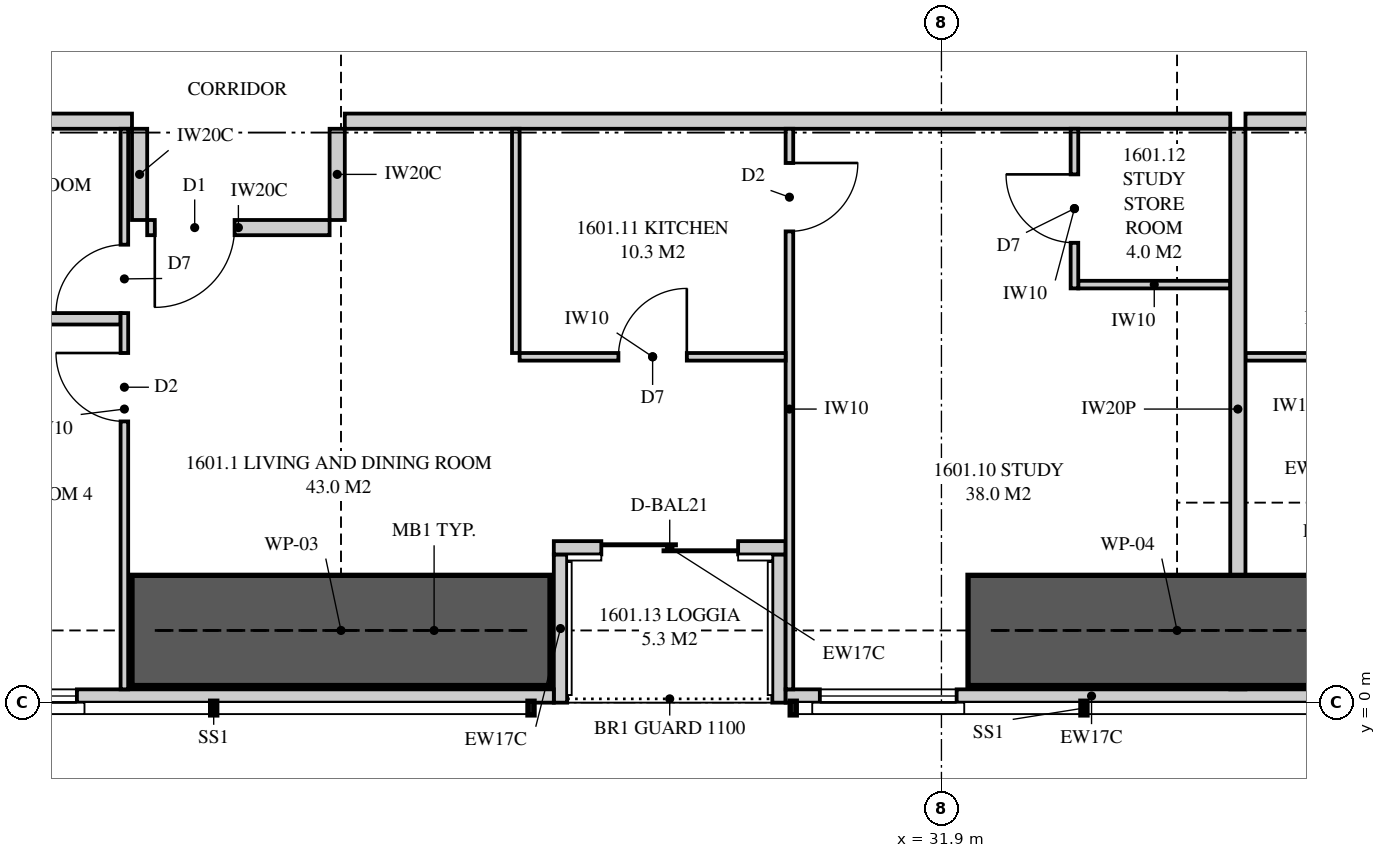
"""IFC4 building model, lengths in metres.
Left out: names, types, materials, properties, quantities, classifications, styles, units other than length and angle.
Written with IfcOpenShell. Run it as: python <this file> out.ifc"""

import sys

from ifc_helpers import new_model, si_unit, direction, frame, frame_2d, origin, place, context, subcontext, project, spatial, polyline, rectangle, outline, extrude, element, fill, save


model = new_model("IFC4")
c1 = context("Model", 3, precision=1e-05, world=origin(), true_north=direction((0.0, 1.0)))
c2 = subcontext(c1, "Body", "Model", "MODEL_VIEW")
j1 = project(units=[si_unit("LENGTHUNIT", "METRE"), si_unit("PLANEANGLEUNIT", "RADIAN")], contexts=[c1])
p1 = place(None, origin())
s1 = spatial("IfcSite", under=j1, at=p1, CompositionType="ELEMENT")
p2 = place(p1, origin())
s2 = spatial("IfcBuilding", under=s1, at=p2, CompositionType="ELEMENT")
p3 = place(p2, frame((0.0, 0.0, 61.2)))
s3 = spatial("IfcBuildingStorey", under=s2, at=p3, CompositionType="ELEMENT", Elevation=61.2)
p4 = place(p3, frame((5.051, 0.087, 0.0), z_axis=(0.0, 0.0, 1.0), x_axis=(1.0, 0.0, 0.0)))
e1 = element("IfcWall", 1, at=p4, inside=s3, PredefinedType="SOLIDWALL", context=c2, shape_type="SweptSolid", body=[
    extrude(outline(polyline([(0.0, 0.0), (21.749, 0.0), (21.749, 2.15), (7.949, 2.15), (7.949, 3.11), (7.793, 3.11), (7.793, 2.15), (7.745, 2.15), (7.745, 3.11), (0.0, 3.11), (0.0, 0.0)])), frame((0.0, 0.087, 0.0), z_axis=(0.0, -1.0, 0.0), x_axis=(1.0, 0.0, 0.0)), (0.0, 0.0, 1.0), 0.175),
])
p5 = place(p4, frame((3.234, 0.0, 0.4)))
e2 = element("IfcOpeningElement", 2, at=p5, cuts=e1, PredefinedType="OPENING", context=c2, shape_type="SweptSolid", body=[
    extrude(rectangle(XDim=1.8, YDim=1.7, at=frame_2d((0.9, 0.85))), frame((0.0, 0.097, 0.0), z_axis=(0.0, -1.0, 0.0), x_axis=(1.0, 0.0, 0.0)), (0.0, 0.0, 1.0), 0.195),
])
p6 = place(p4, frame((10.806, 0.0, 0.4)))
e3 = element("IfcOpeningElement", 3, at=p6, cuts=e1, PredefinedType="OPENING", context=c2, shape_type="SweptSolid", body=[
    extrude(rectangle(XDim=1.8, YDim=1.7, at=frame_2d((0.9, 0.85))), frame((0.0, 0.097, 0.0), z_axis=(0.0, -1.0, 0.0), x_axis=(1.0, 0.0, 0.0)), (0.0, 0.0, 1.0), 0.195),
])
p7 = place(p4, frame((13.674, 0.0, 0.4)))
e4 = element("IfcOpeningElement", 4, at=p7, cuts=e1, PredefinedType="OPENING", context=c2, shape_type="SweptSolid", body=[
    extrude(rectangle(XDim=1.8, YDim=1.7, at=frame_2d((0.9, 0.85))), frame((0.0, 0.097, 0.0), z_axis=(0.0, -1.0, 0.0), x_axis=(1.0, 0.0, 0.0)), (0.0, 0.0, 1.0), 0.195),
])
p8 = place(p3, frame((29.85, 0.087, 0.0), z_axis=(0.0, 0.0, 1.0), x_axis=(1.0, 0.0, 0.0)))
e5 = element("IfcWall", 5, at=p8, inside=s3, PredefinedType="SOLIDWALL", context=c2, shape_type="SweptSolid", body=[
    extrude(outline(polyline([(0.0, 0.0), (8.05, 0.0), (8.05, 3.11), (5.354, 3.11), (5.354, 2.15), (5.306, 2.15), (5.306, 3.11), (5.15, 3.11), (5.15, 2.15), (0.0, 2.15), (0.0, 0.0)])), frame((0.0, 0.087, 0.0), z_axis=(0.0, -1.0, 0.0), x_axis=(1.0, 0.0, 0.0)), (0.0, 0.0, 1.0), 0.175),
])
p9 = place(p8, frame((0.45, 0.0, 0.4)))
e6 = element("IfcOpeningElement", 6, at=p9, cuts=e5, PredefinedType="OPENING", context=c2, shape_type="SweptSolid", body=[
    extrude(rectangle(XDim=1.8, YDim=1.7, at=frame_2d((0.9, 0.85))), frame((0.0, 0.097, 0.0), z_axis=(0.0, -1.0, 0.0), x_axis=(1.0, 0.0, 0.0)), (0.0, 0.0, 1.0), 0.195),
])
p10 = place(p3, frame((26.8, 2.038, 0.0), z_axis=(0.0, 0.0, 1.0), x_axis=(1.0, 0.0, 0.0)))
e7 = element("IfcWall", 7, at=p10, inside=s3, PredefinedType="SOLIDWALL", context=c2, shape_type="SweptSolid", body=[
    extrude(rectangle(XDim=3.05, YDim=0.175, at=frame_2d((1.525, 0.0))), origin(), (0.0, 0.0, 1.0), 3.11),
])
p11 = place(p10, frame((0.625, 0.0, 0.0)))
e8 = element("IfcOpeningElement", 8, at=p11, cuts=e7, PredefinedType="OPENING", context=c2, shape_type="SweptSolid", body=[
    extrude(rectangle(XDim=1.8, YDim=2.1, at=frame_2d((0.9, 1.05))), frame((0.0, 0.097, 0.0), z_axis=(0.0, -1.0, 0.0), x_axis=(1.0, 0.0, 0.0)), (0.0, 0.0, 1.0), 0.195),
])
for number, where, z_axis, x_axis in (
    (9, (26.887, 0.0, 0.0), (0.0, 0.0, 1.0), (0.0, 1.0, 0.0)),
    (10, (29.762, 0.0, 0.0), (0.0, 0.0, 1.0), (0.0, 1.0, 0.0)),
):
    element("IfcWall", number, at=place(p3, frame(where, z_axis=z_axis, x_axis=x_axis)), inside=s3, PredefinedType="SOLIDWALL", context=c2, shape_type="SweptSolid", body=[
        extrude(outline(polyline([(0.0, 0.0), (1.95, 0.0), (1.95, 3.11), (1.75, 3.11), (1.75, 2.15), (0.15, 2.15), (0.15, 3.11), (0.0, 3.11), (0.0, 0.0)])), frame((0.0, 0.087, 0.0), z_axis=(0.0, -1.0, 0.0), x_axis=(1.0, 0.0, 0.0)), (0.0, 0.0, 1.0), 0.175),
    ])
p12 = place(p3, frame((35.8, 0.175, 0.0), z_axis=(0.0, 0.0, 1.0), x_axis=(0.0, 1.0, 0.0)))
e11 = element("IfcWall", 11, at=p12, inside=s3, PredefinedType="PARTITIONING", context=c2, shape_type="SweptSolid", body=[
    extrude(outline(polyline([(0.008, 3.11), (0.0, 3.11), (0.0, 0.0), (0.529, 0.0), (0.529, 0.957), (1.021, 0.957), (1.021, 0.0), (7.375, 0.0), (7.375, 3.11), (3.766, 3.11), (3.766, 2.51), (1.864, 2.51), (1.864, 2.15), (1.021, 2.15), (1.021, 1.193), (0.529, 1.193), (0.529, 2.15), (0.008, 2.15), (0.008, 3.11)])), frame((0.0, 0.1, 0.0), z_axis=(0.0, -1.0, 0.0), x_axis=(1.0, 0.0, 0.0)), (0.0, 0.0, 1.0), 0.2),
])
p13 = place(p3, frame((17.725, 7.65, 0.0), z_axis=(0.0, 0.0, 1.0), x_axis=(1.0, 0.0, 0.0)))
e12 = element("IfcWall", 12, at=p13, inside=s3, PredefinedType="PARTITIONING", context=c2, shape_type="SweptSolid", body=[
    extrude(rectangle(XDim=3.525, YDim=0.2, at=frame_2d((1.762, 0.0))), origin(), (0.0, 0.0, 1.0), 3.11),
])
p14 = place(p3, frame((21.15, 0.175, 0.0), z_axis=(0.0, 0.0, 1.0), x_axis=(0.0, 1.0, 0.0)))
e13 = element("IfcWall", 13, at=p14, inside=s3, PredefinedType="PARTITIONING", context=c2, shape_type="SweptSolid", body=[
    extrude(outline(polyline([(0.0, 0.0), (7.375, 0.0), (7.375, 3.11), (1.635, 3.11), (1.635, 2.15), (0.0, 2.15), (0.0, 3.11), (0.0, 0.0)])), frame((0.0, 0.05, 0.0), z_axis=(0.0, -1.0, 0.0), x_axis=(1.0, 0.0, 0.0)), (0.0, 0.0, 1.0), 0.1),
])
p15 = place(p14, frame((3.525, 0.0, 0.0)))
e14 = element("IfcOpeningElement", 14, at=p15, cuts=e13, PredefinedType="OPENING", context=c2, shape_type="SweptSolid", body=[
    extrude(rectangle(XDim=0.9, YDim=2.1, at=frame_2d((0.45, 1.05))), frame((0.0, 0.06, 0.0), z_axis=(0.0, -1.0, 0.0), x_axis=(1.0, 0.0, 0.0)), (0.0, 0.0, 1.0), 0.12),
])
p16 = place(p14, frame((4.95, 0.0, 0.0)))
e15 = element("IfcOpeningElement", 15, at=p16, cuts=e13, PredefinedType="OPENING", context=c2, shape_type="SweptSolid", body=[
    extrude(rectangle(XDim=0.9, YDim=2.1, at=frame_2d((0.45, 1.05))), frame((0.0, 0.06, 0.0), z_axis=(0.0, -1.0, 0.0), x_axis=(1.0, 0.0, 0.0)), (0.0, 0.0, 1.0), 0.12),
])
p17 = place(p3, frame((18.15, 5.05, 0.0), z_axis=(0.0, 0.0, 1.0), x_axis=(1.0, 0.0, 0.0)))
e16 = element("IfcWall", 16, at=p17, inside=s3, PredefinedType="PLUMBINGWALL", context=c2, shape_type="SweptSolid", body=[
    extrude(rectangle(XDim=2.95, YDim=0.15, at=frame_2d((1.475, 0.0))), origin(), (0.0, 0.0, 1.0), 3.11),
])
p18 = place(p3, frame((29.9, 0.175, 0.0), z_axis=(0.0, 0.0, 1.0), x_axis=(0.0, 1.0, 0.0)))
e17 = element("IfcWall", 17, at=p18, inside=s3, PredefinedType="PARTITIONING", context=c2, shape_type="SweptSolid", body=[
    extrude(outline(polyline([(0.0, 0.0), (7.375, 0.0), (7.375, 3.11), (1.635, 3.11), (1.635, 2.15), (0.0, 2.15), (0.0, 3.11), (0.0, 0.0)])), frame((0.0, 0.05, 0.0), z_axis=(0.0, -1.0, 0.0), x_axis=(1.0, 0.0, 0.0)), (0.0, 0.0, 1.0), 0.1),
])
p19 = place(p18, frame((6.025, 0.0, 0.0)))
e18 = element("IfcOpeningElement", 18, at=p19, cuts=e17, PredefinedType="OPENING", context=c2, shape_type="SweptSolid", body=[
    extrude(rectangle(XDim=0.9, YDim=2.1, at=frame_2d((0.45, 1.05))), frame((0.0, 0.06, 0.0), z_axis=(0.0, -1.0, 0.0), x_axis=(1.0, 0.0, 0.0)), (0.0, 0.0, 1.0), 0.12),
])
p20 = place(p3, frame((26.35, 4.55, 0.0), z_axis=(0.0, 0.0, 1.0), x_axis=(1.0, 0.0, 0.0)))
e19 = element("IfcWall", 19, at=p20, inside=s3, PredefinedType="PARTITIONING", context=c2, shape_type="SweptSolid", body=[
    extrude(rectangle(XDim=3.5, YDim=0.1, at=frame_2d((1.75, 0.0))), origin(), (0.0, 0.0, 1.0), 3.11),
])
p21 = place(p20, frame((1.3, 0.0, 0.0)))
e20 = element("IfcOpeningElement", 20, at=p21, cuts=e19, PredefinedType="OPENING", context=c2, shape_type="SweptSolid", body=[
    extrude(rectangle(XDim=0.9, YDim=2.1, at=frame_2d((0.45, 1.05))), frame((0.0, 0.06, 0.0), z_axis=(0.0, -1.0, 0.0), x_axis=(1.0, 0.0, 0.0)), (0.0, 0.0, 1.0), 0.12),
])
p22 = place(p3, frame((26.3, 4.6, 0.0), z_axis=(0.0, 0.0, 1.0), x_axis=(0.0, 1.0, 0.0)))
e21 = element("IfcWall", 21, at=p22, inside=s3, PredefinedType="PARTITIONING", context=c2, shape_type="SweptSolid", body=[
    extrude(rectangle(XDim=2.95, YDim=0.1, at=frame_2d((1.475, 0.0))), origin(), (0.0, 0.0, 1.0), 3.11),
])
p23 = place(p3, frame((35.9, 7.65, 0.0), z_axis=(0.0, 0.0, 1.0), x_axis=(1.0, 0.0, 0.0)))
e22 = element("IfcWall", 22, at=p23, inside=s3, PredefinedType="PARTITIONING", context=c2, shape_type="SweptSolid", body=[
    extrude(outline(polyline([(0.0, 0.0), (10.1, 0.0), (10.1, 3.11), (9.204, 3.11), (9.204, 2.15), (7.361, 2.15), (7.361, 3.11), (0.0, 3.11), (0.0, 0.0)])), frame((0.0, 0.1, 0.0), z_axis=(0.0, -1.0, 0.0), x_axis=(1.0, 0.0, 0.0)), (0.0, 0.0, 1.0), 0.2),
])
p24 = place(p23, frame((2.1, 0.0, 0.0)))
e23 = element("IfcOpeningElement", 23, at=p24, cuts=e22, PredefinedType="OPENING", context=c2, shape_type="SweptSolid", body=[
    extrude(rectangle(XDim=1.05, YDim=2.2, at=frame_2d((0.525, 1.1))), frame((0.0, 0.11, 0.0), z_axis=(0.0, -1.0, 0.0), x_axis=(1.0, 0.0, 0.0)), (0.0, 0.0, 1.0), 0.22),
])
p25 = place(p3, frame((35.9, 4.55, 0.0), z_axis=(0.0, 0.0, 1.0), x_axis=(1.0, 0.0, 0.0)))
e24 = element("IfcWall", 24, at=p25, inside=s3, PredefinedType="PARTITIONING", context=c2, shape_type="SweptSolid", body=[
    extrude(rectangle(XDim=3.55, YDim=0.1, at=frame_2d((1.775, 0.0))), origin(), (0.0, 0.0, 1.0), 3.11),
])
p26 = place(p25, frame((1.35, 0.0, 0.0)))
e25 = element("IfcOpeningElement", 25, at=p26, cuts=e24, PredefinedType="OPENING", context=c2, shape_type="SweptSolid", body=[
    extrude(rectangle(XDim=0.9, YDim=2.1, at=frame_2d((0.45, 1.05))), frame((0.0, 0.06, 0.0), z_axis=(0.0, -1.0, 0.0), x_axis=(1.0, 0.0, 0.0)), (0.0, 0.0, 1.0), 0.12),
])
p27 = place(p3, frame((24.05, 7.65, 0.0), z_axis=(0.0, 0.0, 1.0), x_axis=(1.0, 0.0, 0.0)))
e26 = element("IfcWall", 26, at=p27, inside=s3, PredefinedType="PARTITIONING", context=c2, shape_type="SweptSolid", body=[
    extrude(outline(polyline([(0.0, 0.0), (11.65, 0.0), (11.65, 3.11), (11.287, 3.11), (11.287, 2.541), (10.613, 2.541), (10.613, 3.11), (0.287, 3.11), (0.287, 2.541), (0.0, 2.541), (0.0, 3.11), (0.0, 0.0)])), frame((0.0, 0.1, 0.0), z_axis=(0.0, -1.0, 0.0), x_axis=(1.0, 0.0, 0.0)), (0.0, 0.0, 1.0), 0.2),
])
p28 = place(p3, frame((21.45, 6.25, 0.0), z_axis=(0.0, 0.0, 1.0), x_axis=(1.0, 0.0, 0.0)))
e27 = element("IfcWall", 27, at=p28, inside=s3, PredefinedType="PARTITIONING", context=c2, shape_type="SweptSolid", body=[
    extrude(outline(polyline([(0.0, 0.0), (2.4, 0.0), (2.4, 3.11), (2.4, 2.541), (2.213, 2.541), (2.213, 3.11), (0.0, 3.11), (0.0, 0.0)])), frame((0.0, 0.1, 0.0), z_axis=(0.0, -1.0, 0.0), x_axis=(1.0, 0.0, 0.0)), (0.0, 0.0, 1.0), 0.2),
])
p29 = place(p28, frame((0.1, 0.0, 0.0)))
e28 = element("IfcOpeningElement", 28, at=p29, cuts=e27, PredefinedType="OPENING", context=c2, shape_type="SweptSolid", body=[
    extrude(rectangle(XDim=1.05, YDim=2.2, at=frame_2d((0.525, 1.1))), frame((0.0, 0.11, 0.0), z_axis=(0.0, -1.0, 0.0), x_axis=(1.0, 0.0, 0.0)), (0.0, 0.0, 1.0), 0.22),
])
p30 = place(p3, frame((21.35, 7.55, 0.0), z_axis=(0.0, 0.0, 1.0), x_axis=(0.0, -1.0, 0.0)))
e29 = element("IfcWall", 29, at=p30, inside=s3, PredefinedType="PARTITIONING", context=c2, shape_type="SweptSolid", body=[
    extrude(rectangle(XDim=1.2, YDim=0.2, at=frame_2d((0.6, 0.0))), origin(), (0.0, 0.0, 1.0), 3.11),
])
p31 = place(p3, frame((23.95, 7.55, 0.0), z_axis=(0.0, 0.0, 1.0), x_axis=(0.0, -1.0, 0.0)))
e30 = element("IfcWall", 30, at=p31, inside=s3, PredefinedType="PARTITIONING", context=c2, shape_type="SweptSolid", body=[
    extrude(outline(polyline([(0.0, 0.0), (1.2, 0.0), (1.2, 3.11), (1.2, 2.541), (0.0, 2.541), (0.0, 3.11), (0.0, 0.0)])), frame((0.0, 0.1, 0.0), z_axis=(0.0, -1.0, 0.0), x_axis=(1.0, 0.0, 0.0)), (0.0, 0.0, 1.0), 0.2),
])
p32 = place(p3, frame((33.65, 7.55, 0.0), z_axis=(0.0, 0.0, 1.0), x_axis=(0.0, -1.0, 0.0)))
e31 = element("IfcWall", 31, at=p32, inside=s3, PredefinedType="PARTITIONING", context=c2, shape_type="SweptSolid", body=[
    extrude(rectangle(XDim=2.1, YDim=0.1, at=frame_2d((1.05, 0.0))), origin(), (0.0, 0.0, 1.0), 3.11),
])
p33 = place(p32, frame((0.6, 0.0, 0.0)))
e32 = element("IfcOpeningElement", 32, at=p33, cuts=e31, PredefinedType="OPENING", context=c2, shape_type="SweptSolid", body=[
    extrude(rectangle(XDim=0.9, YDim=2.1, at=frame_2d((0.45, 1.05))), frame((0.0, 0.06, 0.0), z_axis=(0.0, -1.0, 0.0), x_axis=(1.0, 0.0, 0.0)), (0.0, 0.0, 1.0), 0.12),
])
p34 = place(p3, frame((35.7, 5.5, 0.0), z_axis=(0.0, 0.0, 1.0), x_axis=(-1.0, 0.0, 0.0)))
e33 = element("IfcWall", 33, at=p34, inside=s3, PredefinedType="PARTITIONING", context=c2, shape_type="SweptSolid", body=[
    extrude(outline(polyline([(0.0, 0.0), (2.0, 0.0), (2.0, 3.11), (0.987, 3.11), (0.987, 2.541), (0.413, 2.541), (0.413, 3.11), (0.0, 3.11), (0.0, 0.0)])), frame((0.0, 0.05, 0.0), z_axis=(0.0, -1.0, 0.0), x_axis=(1.0, 0.0, 0.0)), (0.0, 0.0, 1.0), 0.1),
])
for number, where, z_axis, x_axis in (
    (34, (21.25, 0.95, 0.0), (0.0, 0.0, 1.0), (1.0, 0.0, 0.0)),
    (35, (32.25, 0.95, 0.0), (0.0, 0.0, 1.0), (1.0, 0.0, 0.0)),
):
    element("IfcWall", number, at=place(p3, frame(where, z_axis=z_axis, x_axis=x_axis)), inside=s3, PredefinedType="SHEAR", context=c2, shape_type="SweptSolid", body=[
        extrude(rectangle(XDim=5.5, YDim=1.45, at=frame_2d((2.75, 0.0))), origin(), (0.0, 0.0, 1.0), 3.35),
    ])
p35 = place(p7, origin())
e36 = element("IfcWindow", 36, at=p35, inside=s3, PartitioningType="SINGLE_PANEL", PredefinedType="WINDOW", context=c2, shape_type="SweptSolid", body=[
    extrude(rectangle(XDim=1.8, YDim=1.7, at=frame_2d((0.9, 0.85))), frame((0.0, 0.03, 0.0), z_axis=(0.0, -1.0, 0.0), x_axis=(1.0, 0.0, 0.0)), (0.0, 0.0, 1.0), 0.06),
])
fill(e4, e36)
p36 = place(p11, origin())
e37 = element("IfcDoor", 37, at=p36, inside=s3, OperationType="SLIDING_TO_LEFT", PredefinedType="DOOR", context=c2, shape_type="SweptSolid", body=[
    extrude(rectangle(XDim=1.8, YDim=2.1, at=frame_2d((0.9, 1.05))), frame((0.0, 0.025, 0.0), z_axis=(0.0, -1.0, 0.0), x_axis=(1.0, 0.0, 0.0)), (0.0, 0.0, 1.0), 0.05),
])
fill(e8, e37)
p37 = place(p9, origin())
e38 = element("IfcWindow", 38, at=p37, inside=s3, PartitioningType="SINGLE_PANEL", PredefinedType="WINDOW", context=c2, shape_type="SweptSolid", body=[
    extrude(rectangle(XDim=1.8, YDim=1.7, at=frame_2d((0.9, 0.85))), frame((0.0, 0.03, 0.0), z_axis=(0.0, -1.0, 0.0), x_axis=(1.0, 0.0, 0.0)), (0.0, 0.0, 1.0), 0.06),
])
fill(e6, e38)
p38 = place(p29, frame((1.05, 0.0, 0.0), z_axis=(0.0, 0.0, 1.0), x_axis=(-1.0, 0.0, 0.0)))
e39 = element("IfcDoor", 39, at=p38, inside=s3, OperationType="SINGLE_SWING_RIGHT", PredefinedType="DOOR", context=c2, shape_type="SweptSolid", body=[
    extrude(rectangle(XDim=1.05, YDim=2.2, at=frame_2d((0.525, 1.1))), frame((0.0, 0.025, 0.0), z_axis=(0.0, -1.0, 0.0), x_axis=(1.0, 0.0, 0.0)), (0.0, 0.0, 1.0), 0.05),
])
fill(e28, e39)
p39 = place(p15, origin())
e40 = element("IfcDoor", 40, at=p39, inside=s3, OperationType="SINGLE_SWING_RIGHT", PredefinedType="DOOR", context=c2, shape_type="SweptSolid", body=[
    extrude(rectangle(XDim=0.9, YDim=2.1, at=frame_2d((0.45, 1.05))), frame((0.0, 0.025, 0.0), z_axis=(0.0, -1.0, 0.0), x_axis=(1.0, 0.0, 0.0)), (0.0, 0.0, 1.0), 0.05),
])
fill(e14, e40)
p40 = place(p16, origin())
e41 = element("IfcDoor", 41, at=p40, inside=s3, OperationType="SINGLE_SWING_LEFT", PredefinedType="DOOR", context=c2, shape_type="SweptSolid", body=[
    extrude(rectangle(XDim=0.9, YDim=2.1, at=frame_2d((0.45, 1.05))), frame((0.0, 0.025, 0.0), z_axis=(0.0, -1.0, 0.0), x_axis=(1.0, 0.0, 0.0)), (0.0, 0.0, 1.0), 0.05),
])
fill(e15, e41)
p41 = place(p19, frame((0.9, 0.0, 0.0), z_axis=(0.0, 0.0, 1.0), x_axis=(-1.0, 0.0, 0.0)))
e42 = element("IfcDoor", 42, at=p41, inside=s3, OperationType="SINGLE_SWING_LEFT", PredefinedType="DOOR", context=c2, shape_type="SweptSolid", body=[
    extrude(rectangle(XDim=0.9, YDim=2.1, at=frame_2d((0.45, 1.05))), frame((0.0, 0.025, 0.0), z_axis=(0.0, -1.0, 0.0), x_axis=(1.0, 0.0, 0.0)), (0.0, 0.0, 1.0), 0.05),
])
fill(e18, e42)
p42 = place(p21, origin())
e43 = element("IfcDoor", 43, at=p42, inside=s3, OperationType="SINGLE_SWING_RIGHT", PredefinedType="DOOR", context=c2, shape_type="SweptSolid", body=[
    extrude(rectangle(XDim=0.9, YDim=2.1, at=frame_2d((0.45, 1.05))), frame((0.0, 0.025, 0.0), z_axis=(0.0, -1.0, 0.0), x_axis=(1.0, 0.0, 0.0)), (0.0, 0.0, 1.0), 0.05),
])
fill(e20, e43)
p43 = place(p33, frame((0.9, 0.0, 0.0), z_axis=(0.0, 0.0, 1.0), x_axis=(-1.0, 0.0, 0.0)))
e44 = element("IfcDoor", 44, at=p43, inside=s3, OperationType="SINGLE_SWING_RIGHT", PredefinedType="DOOR", context=c2, shape_type="SweptSolid", body=[
    extrude(rectangle(XDim=0.9, YDim=2.1, at=frame_2d((0.45, 1.05))), frame((0.0, 0.025, 0.0), z_axis=(0.0, -1.0, 0.0), x_axis=(1.0, 0.0, 0.0)), (0.0, 0.0, 1.0), 0.05),
])
fill(e32, e44)
save(model, sys.argv[1])
